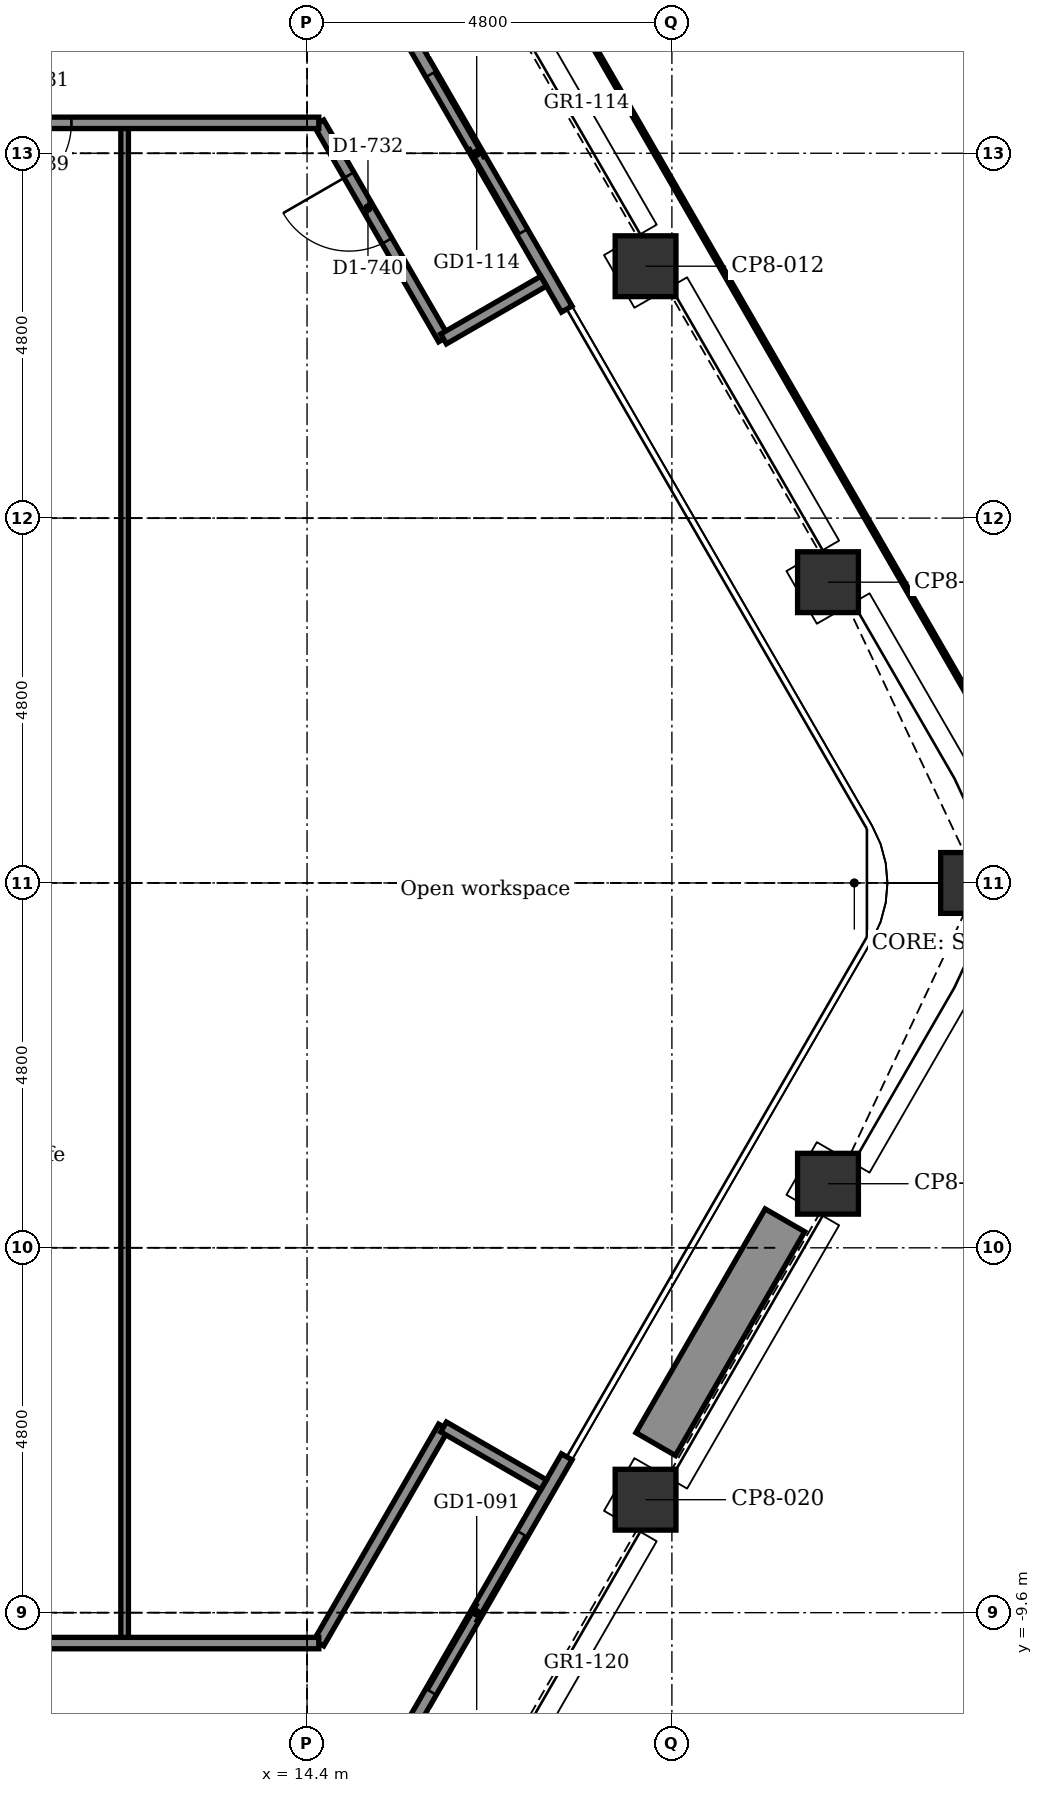
"""IFC4 building model, lengths in metres.
Left out: names, types, materials, properties, quantities, classifications, styles, units other than length and angle.
Written with IfcOpenShell. Run it as: python <this file> out.ifc"""

import sys

from ifc_helpers import new_model, si_unit, direction, frame, frame_2d, origin, origin_2d, place, context, subcontext, project, spatial, rectangle, extrude, element, fill, save


model = new_model("IFC4")
c1 = context("Model", 3, precision=1e-05, world=origin(), true_north=direction((0.0, 1.0)))
c2 = subcontext(c1, "Body", "Model", "MODEL_VIEW")
j1 = project(units=[si_unit("LENGTHUNIT", "METRE"), si_unit("PLANEANGLEUNIT", "RADIAN")], contexts=[c1])
p1 = place(None, origin())
s1 = spatial("IfcSite", under=j1, at=p1, CompositionType="ELEMENT")
p2 = place(p1, origin())
s2 = spatial("IfcBuilding", under=s1, at=p2, CompositionType="ELEMENT")
p3 = place(p2, frame((0.0, 0.0, 273.5)))
s3 = spatial("IfcBuildingStorey", under=s2, at=p3, CompositionType="ELEMENT", Elevation=273.5)
for number, where, z_axis, x_axis in (
    (1, (18.854, 8.114, -0.15), (0.0, 0.0, 1.0), (0.866, 0.5, 0.0)),
    (2, (21.254, 3.957, -0.15), (0.0, 0.0, 1.0), (0.866, 0.5, 0.0)),
    (3, (23.136, 0.0, -0.15), (0.0, 0.0, 1.0), (1.0, 0.0, 0.0)),
    (4, (21.254, -3.957, -0.15), (0.0, 0.0, 1.0), (0.5, 0.866, 0.0)),
    (5, (18.854, -8.114, -0.15), (0.0, 0.0, 1.0), (0.5, 0.866, 0.0)),
):
    element("IfcColumn", number, at=place(p3, frame(where, z_axis=z_axis, x_axis=x_axis)), inside=s3, PredefinedType="COLUMN", context=c2, shape_type="SweptSolid", body=[
        extrude(rectangle(XDim=0.8, YDim=0.8, at=origin_2d()), origin(), (0.0, 0.0, 1.0), 3.9),
    ])
p4 = place(p3, frame((15.447, 11.655, 0.0), z_axis=(0.0, 0.0, 1.0), x_axis=(0.499978080042, -0.866038058908, 0.0)))
e6 = element("IfcWall", 6, at=p4, inside=s3, PredefinedType="PARTITIONING", context=c2, shape_type="SweptSolid", body=[
    extrude(rectangle(XDim=4.74, YDim=0.16, at=frame_2d((2.37, 0.0))), origin(), (0.0, 0.0, 1.0), 3.75),
])
p5 = place(p4, frame((1.17, 0.0, 0.0)))
e7 = element("IfcOpeningElement", 7, at=p5, cuts=e6, PredefinedType="OPENING", context=c2, shape_type="SweptSolid", body=[
    extrude(rectangle(XDim=2.4, YDim=2.4, at=frame_2d((1.2, 1.2))), frame((0.0, 0.09, 0.0), z_axis=(0.0, -1.0, 0.0), x_axis=(1.0, 0.0, 0.0)), (0.0, 0.0, 1.0), 0.18),
])
p6 = place(p3, frame((17.817, -7.55, 0.0), z_axis=(0.0, 0.0, 1.0), x_axis=(-0.499978080042, -0.866038058908, 0.0)))
e8 = element("IfcWall", 8, at=p6, inside=s3, PredefinedType="PARTITIONING", context=c2, shape_type="SweptSolid", body=[
    extrude(rectangle(XDim=4.74, YDim=0.16, at=frame_2d((2.37, 0.0))), origin(), (0.0, 0.0, 1.0), 3.75),
])
p7 = place(p6, frame((1.17, 0.0, 0.0)))
e9 = element("IfcOpeningElement", 9, at=p7, cuts=e8, PredefinedType="OPENING", context=c2, shape_type="SweptSolid", body=[
    extrude(rectangle(XDim=2.4, YDim=2.4, at=frame_2d((1.2, 1.2))), frame((0.0, 0.09, 0.0), z_axis=(0.0, -1.0, 0.0), x_axis=(1.0, 0.0, 0.0)), (0.0, 0.0, 1.0), 0.18),
])
p8 = place(p3, frame((20.687, -4.438, 0.0), z_axis=(0.0, 0.0, 1.0), x_axis=(-0.500008388397, -0.866020560687, 0.0)))
e10 = element("IfcWall", 10, at=p8, inside=s3, PredefinedType="USERDEFINED", context=c2, shape_type="SweptSolid", body=[
    extrude(rectangle(XDim=3.4, YDim=0.6, at=frame_2d((1.7, 0.0))), origin(), (0.0, 0.0, 1.0), 0.7),
])
p9 = place(p3, frame((12.0, -10.0, 0.0), z_axis=(0.0, 0.0, 1.0), x_axis=(0.0, 1.0, 0.0)))
e11 = element("IfcWall", 11, at=p9, inside=s3, PredefinedType="PARTITIONING", context=c2, shape_type="SweptSolid", body=[
    extrude(rectangle(XDim=20.0, YDim=0.1, at=frame_2d((10.0, 0.0))), origin(), (0.0, 0.0, 1.0), 3.75),
])
p10 = place(p3, frame((14.555, 10.0, 0.0), z_axis=(0.0, 0.0, 1.0), x_axis=(0.499954196102, -0.866051847062, 0.0)))
e12 = element("IfcWall", 12, at=p10, inside=s3, PredefinedType="PARTITIONING", context=c2, shape_type="SweptSolid", body=[
    extrude(rectangle(XDim=3.283, YDim=0.15, at=frame_2d((1.642, 0.0))), origin(), (0.0, 0.0, 1.0), 3.75),
])
p11 = place(p10, frame((0.794, 0.0, 0.0)))
e13 = element("IfcOpeningElement", 13, at=p11, cuts=e12, PredefinedType="OPENING", context=c2, shape_type="SweptSolid", body=[
    extrude(rectangle(XDim=1.0, YDim=2.1, at=frame_2d((0.5, 1.05))), frame((0.0, 0.085, 0.0), z_axis=(0.0, -1.0, 0.0), x_axis=(1.0, 0.0, 0.0)), (0.0, 0.0, 1.0), 0.17),
])
p12 = place(p3, frame((14.555, -10.0, 0.0), z_axis=(0.0, 0.0, 1.0), x_axis=(0.499954196102, 0.866051847062, 0.0)))
e14 = element("IfcWall", 14, at=p12, inside=s3, PredefinedType="PARTITIONING", context=c2, shape_type="SweptSolid", body=[
    extrude(rectangle(XDim=3.283, YDim=0.15, at=frame_2d((1.642, 0.0))), origin(), (0.0, 0.0, 1.0), 3.75),
])
for number, where, z_axis, x_axis in (
    (15, (16.196, -7.157, 0.0), (0.0, 0.0, 1.0), (0.866, -0.5, 0.0)),
    (16, (16.196, 7.157, 0.0), (0.0, 0.0, 1.0), (0.866, 0.5, 0.0)),
):
    element("IfcWall", number, at=place(p3, frame(where, z_axis=z_axis, x_axis=x_axis)), inside=s3, PredefinedType="PARTITIONING", context=c2, shape_type="SweptSolid", body=[
        extrude(rectangle(XDim=1.52, YDim=0.15, at=frame_2d((0.76, 0.0))), origin(), (0.0, 0.0, 1.0), 3.75),
    ])
p13 = place(p3, frame((9.875, -10.0, 0.0), z_axis=(0.0, 0.0, 1.0), x_axis=(1.0, 0.0, 0.0)))
e17 = element("IfcWall", 17, at=p13, inside=s3, PredefinedType="PARTITIONING", context=c2, shape_type="SweptSolid", body=[
    extrude(rectangle(XDim=4.68, YDim=0.15, at=frame_2d((2.34, 0.0))), origin(), (0.0, 0.0, 1.0), 3.75),
])
p14 = place(p3, frame((9.6, 10.0, 0.0), z_axis=(0.0, 0.0, 1.0), x_axis=(1.0, 0.0, 0.0)))
e18 = element("IfcWall", 18, at=p14, inside=s3, PredefinedType="PARTITIONING", context=c2, shape_type="SweptSolid", body=[
    extrude(rectangle(XDim=4.955, YDim=0.15, at=frame_2d((2.477, 0.0))), origin(), (0.0, 0.0, 1.0), 3.75),
])
p15 = place(p14, frame((0.7, 0.0, 0.0)))
e19 = element("IfcOpeningElement", 19, at=p15, cuts=e18, PredefinedType="OPENING", context=c2, shape_type="SweptSolid", body=[
    extrude(rectangle(XDim=1.0, YDim=2.1, at=frame_2d((0.5, 1.05))), frame((0.0, 0.085, 0.0), z_axis=(0.0, -1.0, 0.0), x_axis=(1.0, 0.0, 0.0)), (0.0, 0.0, 1.0), 0.17),
])
p16 = place(p5, origin())
e20 = element("IfcDoor", 20, at=p16, inside=s3, OperationType="DOUBLE_DOOR_SLIDING", PredefinedType="DOOR", context=c2, shape_type="SweptSolid", body=[
    extrude(rectangle(XDim=2.4, YDim=2.4, at=frame_2d((1.2, 1.2))), frame((0.0, 0.025, 0.0), z_axis=(0.0, -1.0, 0.0), x_axis=(1.0, 0.0, 0.0)), (0.0, 0.0, 1.0), 0.05),
])
fill(e7, e20)
p17 = place(p7, origin())
e21 = element("IfcDoor", 21, at=p17, inside=s3, OperationType="DOUBLE_DOOR_SLIDING", PredefinedType="DOOR", context=c2, shape_type="SweptSolid", body=[
    extrude(rectangle(XDim=2.4, YDim=2.4, at=frame_2d((1.2, 1.2))), frame((0.0, 0.025, 0.0), z_axis=(0.0, -1.0, 0.0), x_axis=(1.0, 0.0, 0.0)), (0.0, 0.0, 1.0), 0.05),
])
fill(e9, e21)
p18 = place(p15, frame((1.0, 0.0, 0.0), z_axis=(0.0, 0.0, 1.0), x_axis=(-1.0, 0.0, 0.0)))
e22 = element("IfcDoor", 22, at=p18, inside=s3, OperationType="SINGLE_SWING_LEFT", PredefinedType="DOOR", context=c2, shape_type="SweptSolid", body=[
    extrude(rectangle(XDim=1.0, YDim=2.1, at=frame_2d((0.5, 1.05))), frame((0.0, 0.025, 0.0), z_axis=(0.0, -1.0, 0.0), x_axis=(1.0, 0.0, 0.0)), (0.0, 0.0, 1.0), 0.05),
])
fill(e19, e22)
p19 = place(p11, frame((1.0, 0.0, 0.0), z_axis=(0.0, 0.0, 1.0), x_axis=(-1.0, 0.0, 0.0)))
e23 = element("IfcDoor", 23, at=p19, inside=s3, OperationType="SINGLE_SWING_LEFT", PredefinedType="DOOR", context=c2, shape_type="SweptSolid", body=[
    extrude(rectangle(XDim=1.0, YDim=2.1, at=frame_2d((0.5, 1.05))), frame((0.0, 0.025, 0.0), z_axis=(0.0, -1.0, 0.0), x_axis=(1.0, 0.0, 0.0)), (0.0, 0.0, 1.0), 0.05),
])
fill(e13, e23)
save(model, sys.argv[1])
